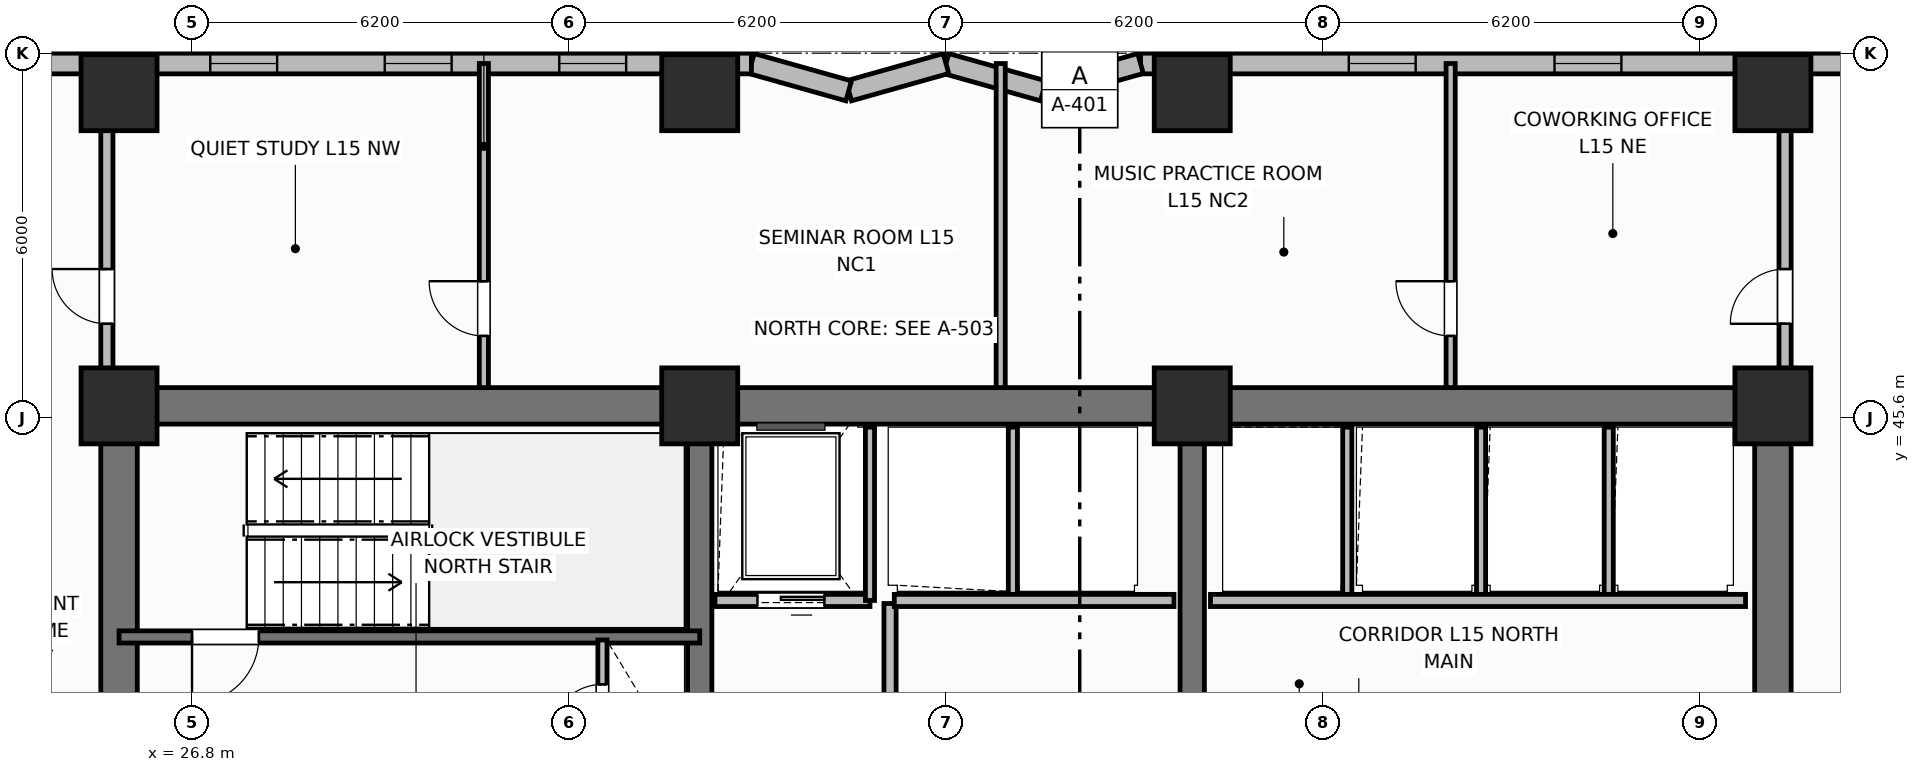
"""IFC4 building model, lengths in metres.
Left out: names, types, materials, properties, quantities, classifications, styles, units other than length and angle.
Written with IfcOpenShell. Run it as: python <this file> out.ifc"""

import sys

from ifc_helpers import new_model, si_unit, direction, frame, frame_2d, origin, origin_2d, place, context, subcontext, project, spatial, rectangle, extrude, element, fill, save


model = new_model("IFC4")
c1 = context("Model", 3, precision=1e-05, world=origin(), true_north=direction((0.0, 1.0)))
c2 = subcontext(c1, "Body", "Model", "MODEL_VIEW")
j1 = project(units=[si_unit("LENGTHUNIT", "METRE"), si_unit("PLANEANGLEUNIT", "RADIAN")], contexts=[c1])
p1 = place(None, origin())
s1 = spatial("IfcSite", under=j1, at=p1, CompositionType="ELEMENT")
p2 = place(p1, origin())
s2 = spatial("IfcBuilding", under=s1, at=p2, CompositionType="ELEMENT")
p3 = place(p2, frame((0.0, 0.0, 62.1)))
s3 = spatial("IfcBuildingStorey", under=s2, at=p3, CompositionType="ELEMENT", Elevation=62.1)
p4 = place(p3, frame((25.6, 45.8, 0.0), z_axis=(0.0, 0.0, 1.0), x_axis=(1.0, 0.0, 0.0)))
e1 = element("IfcWall", 1, at=p4, inside=s3, PredefinedType="SHEAR", context=c2, shape_type="SweptSolid", body=[
    extrude(rectangle(XDim=27.2, YDim=0.6, at=frame_2d((13.6, 0.0))), origin(), (0.0, 0.0, 1.0), 3.7),
])
for number, where, z_axis, x_axis in (
    (2, (25.6, 39.9, 0.0), (0.0, 0.0, 1.0), (0.0, 1.0, 0.0)),
    (3, (52.8, 39.9, 0.0), (0.0, 0.0, 1.0), (0.0, 1.0, 0.0)),
):
    element("IfcWall", number, at=place(p3, frame(where, z_axis=z_axis, x_axis=x_axis)), inside=s3, PredefinedType="SHEAR", context=c2, shape_type="SweptSolid", body=[
        extrude(rectangle(XDim=5.6, YDim=0.6, at=frame_2d((2.8, 0.0))), origin(), (0.0, 0.0, 1.0), 3.7),
    ])
for number, where, z_axis, x_axis in (
    (4, (35.15, 39.9, 0.0), (0.0, 0.0, 1.0), (0.0, 1.0, 0.0)),
    (5, (43.25, 39.9, 0.0), (0.0, 0.0, 1.0), (0.0, 1.0, 0.0)),
):
    element("IfcWall", number, at=place(p3, frame(where, z_axis=z_axis, x_axis=x_axis)), inside=s3, PredefinedType="SHEAR", context=c2, shape_type="SweptSolid", body=[
        extrude(rectangle(XDim=5.6, YDim=0.4, at=frame_2d((2.8, 0.0))), origin(), (0.0, 0.0, 1.0), 3.7),
    ])
for number, where, z_axis, x_axis in (
    (6, (25.6, 45.8, 0.0), (0.0, 0.0, 1.0), (1.0, 0.0, 0.0)),
    (7, (35.15, 45.8, 0.0), (0.0, 0.0, 1.0), (1.0, 0.0, 0.0)),
    (8, (43.25, 45.8, 0.0), (0.0, 0.0, 1.0), (1.0, 0.0, 0.0)),
    (9, (52.8, 45.8, 0.0), (0.0, 0.0, 1.0), (1.0, 0.0, 0.0)),
    (10, (25.6, 50.95, 0.0), (0.0, 0.0, 1.0), (1.0, 0.0, 0.0)),
    (11, (35.15, 50.95, 0.0), (0.0, 0.0, 1.0), (1.0, 0.0, 0.0)),
    (12, (43.25, 50.95, 0.0), (0.0, 0.0, 1.0), (1.0, 0.0, 0.0)),
    (13, (52.8, 50.95, 0.0), (0.0, 0.0, 1.0), (1.0, 0.0, 0.0)),
):
    element("IfcColumn", number, at=place(p3, frame(where, z_axis=z_axis, x_axis=x_axis)), inside=s3, PredefinedType="COLUMN", context=c2, shape_type="SweptSolid", body=[
        extrude(rectangle(XDim=1.25, YDim=1.25, at=origin_2d()), origin(), (0.0, 0.0, 1.0), 3.7),
    ])
p5 = place(p3, frame((59.8, 51.43, 0.0), z_axis=(0.0, 0.0, 1.0), x_axis=(-1.0, 0.0, 0.0)))
e14 = element("IfcWall", 14, at=p5, inside=s3, PredefinedType="SOLIDWALL", context=c2, shape_type="SweptSolid", body=[
    extrude(rectangle(XDim=17.4, YDim=0.34, at=frame_2d((8.7, 0.0))), origin(), (0.0, 0.0, 1.0), 2.7),
])
p6 = place(p5, frame((1.442, 0.0, 0.93)))
e15 = element("IfcOpeningElement", 15, at=p6, cuts=e14, PredefinedType="OPENING", context=c2, shape_type="SweptSolid", body=[
    extrude(rectangle(XDim=1.1, YDim=1.65, at=frame_2d((0.55, 0.825))), frame((0.0, 0.18, 0.0), z_axis=(0.0, -1.0, 0.0), x_axis=(1.0, 0.0, 0.0)), (0.0, 0.0, 1.0), 0.36),
])
p7 = place(p5, frame((3.425, 0.0, 0.93)))
e16 = element("IfcOpeningElement", 16, at=p7, cuts=e14, PredefinedType="OPENING", context=c2, shape_type="SweptSolid", body=[
    extrude(rectangle(XDim=1.1, YDim=1.65, at=frame_2d((0.55, 0.825))), frame((0.0, 0.18, 0.0), z_axis=(0.0, -1.0, 0.0), x_axis=(1.0, 0.0, 0.0)), (0.0, 0.0, 1.0), 0.36),
])
p8 = place(p5, frame((9.492, 0.0, 0.93)))
e17 = element("IfcOpeningElement", 17, at=p8, cuts=e14, PredefinedType="OPENING", context=c2, shape_type="SweptSolid", body=[
    extrude(rectangle(XDim=1.1, YDim=1.65, at=frame_2d((0.55, 0.825))), frame((0.0, 0.18, 0.0), z_axis=(0.0, -1.0, 0.0), x_axis=(1.0, 0.0, 0.0)), (0.0, 0.0, 1.0), 0.36),
])
p9 = place(p5, frame((12.875, 0.0, 0.93)))
e18 = element("IfcOpeningElement", 18, at=p9, cuts=e14, PredefinedType="OPENING", context=c2, shape_type="SweptSolid", body=[
    extrude(rectangle(XDim=1.1, YDim=1.65, at=frame_2d((0.55, 0.825))), frame((0.0, 0.18, 0.0), z_axis=(0.0, -1.0, 0.0), x_axis=(1.0, 0.0, 0.0)), (0.0, 0.0, 1.0), 0.36),
])
p10 = place(p3, frame((42.4, 51.43, 0.0), z_axis=(0.0, 0.0, 1.0), x_axis=(-0.962652136636, -0.270741322725, 0.0)))
e19 = element("IfcWall", 19, at=p10, inside=s3, PredefinedType="SOLIDWALL", context=c2, shape_type="SweptSolid", body=[
    extrude(rectangle(XDim=1.662, YDim=0.34, at=frame_2d((0.831, 0.0))), origin(), (0.0, 0.0, 1.0), 2.7),
])
p11 = place(p3, frame((40.8, 50.98, 0.0), z_axis=(0.0, 0.0, 1.0), x_axis=(-0.962662902433, 0.270703040766, 0.0)))
e20 = element("IfcWall", 20, at=p11, inside=s3, PredefinedType="SOLIDWALL", context=c2, shape_type="SweptSolid", body=[
    extrude(rectangle(XDim=1.662, YDim=0.34, at=frame_2d((0.831, 0.0))), origin(), (0.0, 0.0, 1.0), 2.7),
])
p12 = place(p3, frame((39.2, 51.43, 0.0), z_axis=(0.0, 0.0, 1.0), x_axis=(-0.962652136636, -0.270741322725, 0.0)))
e21 = element("IfcWall", 21, at=p12, inside=s3, PredefinedType="SOLIDWALL", context=c2, shape_type="SweptSolid", body=[
    extrude(rectangle(XDim=1.662, YDim=0.34, at=frame_2d((0.831, 0.0))), origin(), (0.0, 0.0, 1.0), 2.7),
])
p13 = place(p3, frame((37.6, 50.98, 0.0), z_axis=(0.0, 0.0, 1.0), x_axis=(-0.962662902433, 0.270703040766, 0.0)))
e22 = element("IfcWall", 22, at=p13, inside=s3, PredefinedType="SOLIDWALL", context=c2, shape_type="SweptSolid", body=[
    extrude(rectangle(XDim=1.662, YDim=0.34, at=frame_2d((0.831, 0.0))), origin(), (0.0, 0.0, 1.0), 2.7),
])
p14 = place(p3, frame((36.0, 51.43, 0.0), z_axis=(0.0, 0.0, 1.0), x_axis=(-1.0, 0.0, 0.0)))
e23 = element("IfcWall", 23, at=p14, inside=s3, PredefinedType="SOLIDWALL", context=c2, shape_type="SweptSolid", body=[
    extrude(rectangle(XDim=17.4, YDim=0.34, at=frame_2d((8.7, 0.0))), origin(), (0.0, 0.0, 1.0), 2.7),
])
p15 = place(p14, frame((2.06, 0.0, 0.93)))
e24 = element("IfcOpeningElement", 24, at=p15, cuts=e23, PredefinedType="OPENING", context=c2, shape_type="SweptSolid", body=[
    extrude(rectangle(XDim=1.1, YDim=1.65, at=frame_2d((0.55, 0.825))), frame((0.0, 0.18, 0.0), z_axis=(0.0, -1.0, 0.0), x_axis=(1.0, 0.0, 0.0)), (0.0, 0.0, 1.0), 0.36),
])
p16 = place(p14, frame((4.93, 0.0, 0.93)))
e25 = element("IfcOpeningElement", 25, at=p16, cuts=e23, PredefinedType="OPENING", context=c2, shape_type="SweptSolid", body=[
    extrude(rectangle(XDim=1.1, YDim=1.65, at=frame_2d((0.55, 0.825))), frame((0.0, 0.18, 0.0), z_axis=(0.0, -1.0, 0.0), x_axis=(1.0, 0.0, 0.0)), (0.0, 0.0, 1.0), 0.36),
])
p17 = place(p14, frame((7.8, 0.0, 0.93)))
e26 = element("IfcOpeningElement", 26, at=p17, cuts=e23, PredefinedType="OPENING", context=c2, shape_type="SweptSolid", body=[
    extrude(rectangle(XDim=1.1, YDim=1.65, at=frame_2d((0.55, 0.825))), frame((0.0, 0.18, 0.0), z_axis=(0.0, -1.0, 0.0), x_axis=(1.0, 0.0, 0.0)), (0.0, 0.0, 1.0), 0.36),
])
p18 = place(p14, frame((11.72, 0.0, 0.93)))
e27 = element("IfcOpeningElement", 27, at=p18, cuts=e23, PredefinedType="OPENING", context=c2, shape_type="SweptSolid", body=[
    extrude(rectangle(XDim=1.1, YDim=1.65, at=frame_2d((0.55, 0.825))), frame((0.0, 0.18, 0.0), z_axis=(0.0, -1.0, 0.0), x_axis=(1.0, 0.0, 0.0)), (0.0, 0.0, 1.0), 0.36),
])
p19 = place(p14, frame((14.59, 0.0, 0.93)))
e28 = element("IfcOpeningElement", 28, at=p19, cuts=e23, PredefinedType="OPENING", context=c2, shape_type="SweptSolid", body=[
    extrude(rectangle(XDim=1.1, YDim=1.65, at=frame_2d((0.55, 0.825))), frame((0.0, 0.18, 0.0), z_axis=(0.0, -1.0, 0.0), x_axis=(1.0, 0.0, 0.0)), (0.0, 0.0, 1.0), 0.36),
])
p20 = place(p3, frame((35.15, 42.0, 0.0), z_axis=(0.0, 0.0, 1.0), x_axis=(-1.0, 0.0, 0.0)))
e29 = element("IfcWall", 29, at=p20, inside=s3, PredefinedType="SHEAR", context=c2, shape_type="SweptSolid", body=[
    extrude(rectangle(XDim=9.55, YDim=0.2, at=frame_2d((4.775, 0.0))), origin(), (0.0, 0.0, 1.0), 3.7),
])
p21 = place(p20, frame((7.25, 0.0, 0.0)))
e30 = element("IfcOpeningElement", 30, at=p21, cuts=e29, PredefinedType="OPENING", context=c2, shape_type="SweptSolid", body=[
    extrude(rectangle(XDim=1.1, YDim=2.15, at=frame_2d((0.55, 1.075))), frame((0.0, 0.11, 0.0), z_axis=(0.0, -1.0, 0.0), x_axis=(1.0, 0.0, 0.0)), (0.0, 0.0, 1.0), 0.22),
])
p22 = place(p3, frame((33.55, 39.82, 0.0), z_axis=(0.0, 0.0, 1.0), x_axis=(0.0, 1.0, 0.0)))
e31 = element("IfcWall", 31, at=p22, inside=s3, PredefinedType="PARTITIONING", context=c2, shape_type="SweptSolid", body=[
    extrude(rectangle(XDim=2.13, YDim=0.15, at=frame_2d((1.065, 0.0))), origin(), (0.0, 0.0, 1.0), 2.53),
])
p23 = place(p22, frame((0.55, 0.0, 0.0)))
e32 = element("IfcOpeningElement", 32, at=p23, cuts=e31, PredefinedType="OPENING", context=c2, shape_type="SweptSolid", body=[
    extrude(rectangle(XDim=0.85, YDim=2.05, at=frame_2d((0.425, 1.025))), frame((0.0, 0.085, 0.0), z_axis=(0.0, -1.0, 0.0), x_axis=(1.0, 0.0, 0.0)), (0.0, 0.0, 1.0), 0.17),
])
p24 = place(p3, frame((37.95, 42.6, 0.0), z_axis=(0.0, 0.0, 1.0), x_axis=(-1.0, 0.0, 0.0)))
e33 = element("IfcWall", 33, at=p24, inside=s3, PredefinedType="PARTITIONING", context=c2, shape_type="SweptSolid", body=[
    extrude(rectangle(XDim=2.55, YDim=0.2, at=frame_2d((1.275, 0.0))), origin(), (0.0, 0.0, 1.0), 2.3),
])
p25 = place(p24, frame((0.75, 0.0, 0.0)))
e34 = element("IfcOpeningElement", 34, at=p25, cuts=e33, PredefinedType="OPENING", context=c2, shape_type="SweptSolid", body=[
    extrude(rectangle(XDim=1.1, YDim=2.15, at=frame_2d((0.55, 1.075))), frame((0.0, 0.11, 0.0), z_axis=(0.0, -1.0, 0.0), x_axis=(1.0, 0.0, 0.0)), (0.0, 0.0, 1.0), 0.22),
])
p26 = place(p3, frame((37.95, 42.6, 0.0), z_axis=(0.0, 0.0, 1.0), x_axis=(0.0, 1.0, 0.0)))
e35 = element("IfcWall", 35, at=p26, inside=s3, PredefinedType="PARTITIONING", context=c2, shape_type="SweptSolid", body=[
    extrude(rectangle(XDim=2.85, YDim=0.15, at=frame_2d((1.425, 0.0))), origin(), (0.0, 0.0, 1.0), 2.53),
])
p27 = place(p3, frame((38.28, 39.82, 0.0), z_axis=(0.0, 0.0, 1.0), x_axis=(0.0, 1.0, 0.0)))
e36 = element("IfcWall", 36, at=p27, inside=s3, PredefinedType="PARTITIONING", context=c2, shape_type="SweptSolid", body=[
    extrude(rectangle(XDim=2.73, YDim=0.2, at=frame_2d((1.365, 0.0))), origin(), (0.0, 0.0, 1.0), 2.53),
])
p28 = place(p3, frame((40.3, 42.65, 0.0), z_axis=(0.0, 0.0, 1.0), x_axis=(0.0, 1.0, 0.0)))
e37 = element("IfcWall", 37, at=p28, inside=s3, PredefinedType="PARTITIONING", context=c2, shape_type="SweptSolid", body=[
    extrude(rectangle(XDim=2.8, YDim=0.15, at=frame_2d((1.4, 0.0))), origin(), (0.0, 0.0, 1.0), 2.53),
])
p29 = place(p3, frame((42.95, 42.6, 0.0), z_axis=(0.0, 0.0, 1.0), x_axis=(-1.0, 0.0, 0.0)))
e38 = element("IfcWall", 38, at=p29, inside=s3, PredefinedType="PARTITIONING", context=c2, shape_type="SweptSolid", body=[
    extrude(rectangle(XDim=4.6, YDim=0.2, at=frame_2d((2.3, 0.0))), origin(), (0.0, 0.0, 1.0), 2.3),
])
for number, where, z_axis, x_axis in (
    (39, (45.8, 42.65, 0.0), (0.0, 0.0, 1.0), (0.0, 1.0, 0.0)),
    (40, (48.0, 42.65, 0.0), (0.0, 0.0, 1.0), (0.0, 1.0, 0.0)),
    (41, (50.1, 42.65, 0.0), (0.0, 0.0, 1.0), (0.0, 1.0, 0.0)),
):
    element("IfcWall", number, at=place(p3, frame(where, z_axis=z_axis, x_axis=x_axis)), inside=s3, PredefinedType="PARTITIONING", context=c2, shape_type="SweptSolid", body=[
        extrude(rectangle(XDim=2.8, YDim=0.15, at=frame_2d((1.4, 0.0))), origin(), (0.0, 0.0, 1.0), 2.53),
    ])
p30 = place(p3, frame((52.35, 42.6, 0.0), z_axis=(0.0, 0.0, 1.0), x_axis=(-1.0, 0.0, 0.0)))
e42 = element("IfcWall", 42, at=p30, inside=s3, PredefinedType="PARTITIONING", context=c2, shape_type="SweptSolid", body=[
    extrude(rectangle(XDim=8.8, YDim=0.2, at=frame_2d((4.4, 0.0))), origin(), (0.0, 0.0, 1.0), 2.53),
])
p31 = place(p3, frame((31.6, 46.1, 0.0), z_axis=(0.0, 0.0, 1.0), x_axis=(0.0, 1.0, 0.0)))
e43 = element("IfcWall", 43, at=p31, inside=s3, PredefinedType="PARTITIONING", context=c2, shape_type="SweptSolid", body=[
    extrude(rectangle(XDim=5.33, YDim=0.15, at=frame_2d((2.665, 0.0))), origin(), (0.0, 0.0, 1.0), 2.53),
])
p32 = place(p31, frame((0.85, 0.0, 0.0)))
e44 = element("IfcOpeningElement", 44, at=p32, cuts=e43, PredefinedType="OPENING", context=c2, shape_type="SweptSolid", body=[
    extrude(rectangle(XDim=0.9, YDim=2.1, at=frame_2d((0.45, 1.05))), frame((0.0, 0.085, 0.0), z_axis=(0.0, -1.0, 0.0), x_axis=(1.0, 0.0, 0.0)), (0.0, 0.0, 1.0), 0.17),
])
p33 = place(p3, frame((40.1, 46.1, 0.0), z_axis=(0.0, 0.0, 1.0), x_axis=(0.0, 1.0, 0.0)))
e45 = element("IfcWall", 45, at=p33, inside=s3, PredefinedType="PARTITIONING", context=c2, shape_type="SweptSolid", body=[
    extrude(rectangle(XDim=5.33, YDim=0.15, at=frame_2d((2.665, 0.0))), origin(), (0.0, 0.0, 1.0), 2.53),
])
p34 = place(p3, frame((47.5, 46.1, 0.0), z_axis=(0.0, 0.0, 1.0), x_axis=(0.0, 1.0, 0.0)))
e46 = element("IfcWall", 46, at=p34, inside=s3, PredefinedType="PARTITIONING", context=c2, shape_type="SweptSolid", body=[
    extrude(rectangle(XDim=5.33, YDim=0.15, at=frame_2d((2.665, 0.0))), origin(), (0.0, 0.0, 1.0), 2.53),
])
p35 = place(p34, frame((0.85, 0.0, 0.0)))
e47 = element("IfcOpeningElement", 47, at=p35, cuts=e46, PredefinedType="OPENING", context=c2, shape_type="SweptSolid", body=[
    extrude(rectangle(XDim=0.9, YDim=2.1, at=frame_2d((0.45, 1.05))), frame((0.0, 0.085, 0.0), z_axis=(0.0, -1.0, 0.0), x_axis=(1.0, 0.0, 0.0)), (0.0, 0.0, 1.0), 0.17),
])
p36 = place(p3, frame((25.4, 46.1, 0.0), z_axis=(0.0, 0.0, 1.0), x_axis=(0.0, 1.0, 0.0)))
e48 = element("IfcWall", 48, at=p36, inside=s3, PredefinedType="PARTITIONING", context=c2, shape_type="SweptSolid", body=[
    extrude(rectangle(XDim=4.58, YDim=0.2, at=frame_2d((2.29, 0.0))), origin(), (0.0, 0.0, 1.0), 2.53),
])
p37 = place(p36, frame((1.05, 0.0, 0.0)))
e49 = element("IfcOpeningElement", 49, at=p37, cuts=e48, PredefinedType="OPENING", context=c2, shape_type="SweptSolid", body=[
    extrude(rectangle(XDim=0.9, YDim=2.1, at=frame_2d((0.45, 1.05))), frame((0.0, 0.11, 0.0), z_axis=(0.0, -1.0, 0.0), x_axis=(1.0, 0.0, 0.0)), (0.0, 0.0, 1.0), 0.22),
])
p38 = place(p3, frame((53.0, 46.1, 0.0), z_axis=(0.0, 0.0, 1.0), x_axis=(0.0, 1.0, 0.0)))
e50 = element("IfcWall", 50, at=p38, inside=s3, PredefinedType="PARTITIONING", context=c2, shape_type="SweptSolid", body=[
    extrude(rectangle(XDim=4.58, YDim=0.2, at=frame_2d((2.29, 0.0))), origin(), (0.0, 0.0, 1.0), 2.53),
])
p39 = place(p38, frame((1.05, 0.0, 0.0)))
e51 = element("IfcOpeningElement", 51, at=p39, cuts=e50, PredefinedType="OPENING", context=c2, shape_type="SweptSolid", body=[
    extrude(rectangle(XDim=0.9, YDim=2.1, at=frame_2d((0.45, 1.05))), frame((0.0, 0.11, 0.0), z_axis=(0.0, -1.0, 0.0), x_axis=(1.0, 0.0, 0.0)), (0.0, 0.0, 1.0), 0.22),
])
p40 = place(p8, origin())
e52 = element("IfcWindow", 52, at=p40, inside=s3, PartitioningType="SINGLE_PANEL", PredefinedType="WINDOW", context=c2, shape_type="SweptSolid", body=[
    extrude(rectangle(XDim=1.1, YDim=1.65, at=frame_2d((0.55, 0.825))), frame((0.0, 0.03, 0.0), z_axis=(0.0, -1.0, 0.0), x_axis=(1.0, 0.0, 0.0)), (0.0, 0.0, 1.0), 0.06),
])
fill(e17, e52)
p41 = place(p9, origin())
e53 = element("IfcWindow", 53, at=p41, inside=s3, PartitioningType="SINGLE_PANEL", PredefinedType="WINDOW", context=c2, shape_type="SweptSolid", body=[
    extrude(rectangle(XDim=1.1, YDim=1.65, at=frame_2d((0.55, 0.825))), frame((0.0, 0.03, 0.0), z_axis=(0.0, -1.0, 0.0), x_axis=(1.0, 0.0, 0.0)), (0.0, 0.0, 1.0), 0.06),
])
fill(e18, e53)
p42 = place(p15, origin())
e54 = element("IfcWindow", 54, at=p42, inside=s3, PartitioningType="SINGLE_PANEL", PredefinedType="WINDOW", context=c2, shape_type="SweptSolid", body=[
    extrude(rectangle(XDim=1.1, YDim=1.65, at=frame_2d((0.55, 0.825))), frame((0.0, 0.03, 0.0), z_axis=(0.0, -1.0, 0.0), x_axis=(1.0, 0.0, 0.0)), (0.0, 0.0, 1.0), 0.06),
])
fill(e24, e54)
p43 = place(p16, origin())
e55 = element("IfcWindow", 55, at=p43, inside=s3, PartitioningType="SINGLE_PANEL", PredefinedType="WINDOW", context=c2, shape_type="SweptSolid", body=[
    extrude(rectangle(XDim=1.1, YDim=1.65, at=frame_2d((0.55, 0.825))), frame((0.0, 0.03, 0.0), z_axis=(0.0, -1.0, 0.0), x_axis=(1.0, 0.0, 0.0)), (0.0, 0.0, 1.0), 0.06),
])
fill(e25, e55)
p44 = place(p17, origin())
e56 = element("IfcWindow", 56, at=p44, inside=s3, PartitioningType="SINGLE_PANEL", PredefinedType="WINDOW", context=c2, shape_type="SweptSolid", body=[
    extrude(rectangle(XDim=1.1, YDim=1.65, at=frame_2d((0.55, 0.825))), frame((0.0, 0.03, 0.0), z_axis=(0.0, -1.0, 0.0), x_axis=(1.0, 0.0, 0.0)), (0.0, 0.0, 1.0), 0.06),
])
fill(e26, e56)
p45 = place(p21, origin())
e57 = element("IfcDoor", 57, at=p45, inside=s3, OperationType="SINGLE_SWING_RIGHT", PredefinedType="DOOR", context=c2, shape_type="SweptSolid", body=[
    extrude(rectangle(XDim=1.1, YDim=2.15, at=frame_2d((0.55, 1.075))), frame((0.0, 0.025, 0.0), z_axis=(0.0, -1.0, 0.0), x_axis=(1.0, 0.0, 0.0)), (0.0, 0.0, 1.0), 0.05),
])
fill(e30, e57)
p46 = place(p23, origin())
e58 = element("IfcDoor", 58, at=p46, inside=s3, OperationType="SINGLE_SWING_LEFT", PredefinedType="TRAPDOOR", context=c2, shape_type="SweptSolid", body=[
    extrude(rectangle(XDim=0.85, YDim=2.05, at=frame_2d((0.425, 1.025))), frame((0.0, 0.025, 0.0), z_axis=(0.0, -1.0, 0.0), x_axis=(1.0, 0.0, 0.0)), (0.0, 0.0, 1.0), 0.05),
])
fill(e32, e58)
p47 = place(p25, origin())
e59 = element("IfcDoor", 59, at=p47, inside=s3, OperationType="SLIDING_TO_LEFT", PredefinedType="DOOR", context=c2, shape_type="SweptSolid", body=[
    extrude(rectangle(XDim=1.1, YDim=2.15, at=frame_2d((0.55, 1.075))), frame((0.0, 0.025, 0.0), z_axis=(0.0, -1.0, 0.0), x_axis=(1.0, 0.0, 0.0)), (0.0, 0.0, 1.0), 0.05),
])
fill(e34, e59)
p48 = place(p32, origin())
e60 = element("IfcDoor", 60, at=p48, inside=s3, OperationType="SINGLE_SWING_RIGHT", PredefinedType="DOOR", context=c2, shape_type="SweptSolid", body=[
    extrude(rectangle(XDim=0.9, YDim=2.1, at=frame_2d((0.45, 1.05))), frame((0.0, 0.025, 0.0), z_axis=(0.0, -1.0, 0.0), x_axis=(1.0, 0.0, 0.0)), (0.0, 0.0, 1.0), 0.05),
])
fill(e44, e60)
p49 = place(p35, origin())
e61 = element("IfcDoor", 61, at=p49, inside=s3, OperationType="SINGLE_SWING_RIGHT", PredefinedType="DOOR", context=c2, shape_type="SweptSolid", body=[
    extrude(rectangle(XDim=0.9, YDim=2.1, at=frame_2d((0.45, 1.05))), frame((0.0, 0.025, 0.0), z_axis=(0.0, -1.0, 0.0), x_axis=(1.0, 0.0, 0.0)), (0.0, 0.0, 1.0), 0.05),
])
fill(e47, e61)
p50 = place(p37, origin())
e62 = element("IfcDoor", 62, at=p50, inside=s3, OperationType="SINGLE_SWING_RIGHT", PredefinedType="DOOR", context=c2, shape_type="SweptSolid", body=[
    extrude(rectangle(XDim=0.9, YDim=2.1, at=frame_2d((0.45, 1.05))), frame((0.0, 0.025, 0.0), z_axis=(0.0, -1.0, 0.0), x_axis=(1.0, 0.0, 0.0)), (0.0, 0.0, 1.0), 0.05),
])
fill(e49, e62)
p51 = place(p39, origin())
e63 = element("IfcDoor", 63, at=p51, inside=s3, OperationType="SINGLE_SWING_LEFT", PredefinedType="DOOR", context=c2, shape_type="SweptSolid", body=[
    extrude(rectangle(XDim=0.9, YDim=2.1, at=frame_2d((0.45, 1.05))), frame((0.0, 0.025, 0.0), z_axis=(0.0, -1.0, 0.0), x_axis=(1.0, 0.0, 0.0)), (0.0, 0.0, 1.0), 0.05),
])
fill(e51, e63)
save(model, sys.argv[1])
